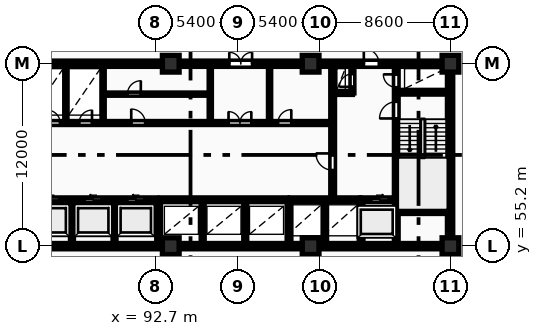
"""IFC4 building model, lengths in metres.
Left out: names, types, materials, properties, quantities, classifications, styles, units other than length and angle.
Written with IfcOpenShell. Run it as: python <this file> out.ifc"""

import sys

from ifc_helpers import new_model, si_unit, direction, frame, frame_2d, origin, origin_2d, place, context, subcontext, project, spatial, rectangle, extrude, element, fill, save


model = new_model("IFC4")
c1 = context("Model", 3, precision=1e-05, world=origin(), true_north=direction((0.0, 1.0)))
c2 = subcontext(c1, "Body", "Model", "MODEL_VIEW")
j1 = project(units=[si_unit("LENGTHUNIT", "METRE"), si_unit("PLANEANGLEUNIT", "RADIAN")], contexts=[c1])
p1 = place(None, origin())
s1 = spatial("IfcSite", under=j1, at=p1, CompositionType="ELEMENT")
p2 = place(p1, origin())
s2 = spatial("IfcBuilding", under=s1, at=p2, CompositionType="ELEMENT")
p3 = place(p2, frame((0.0, 0.0, -3.6)))
s3 = spatial("IfcBuildingStorey", under=s2, at=p3, CompositionType="ELEMENT", Elevation=-3.6)
for number, where, z_axis, x_axis in (
    (1, (93.7, 55.2, 0.0), (0.0, 0.0, 1.0), (1.0, 0.0, 0.0)),
    (2, (93.7, 67.2, 0.0), (0.0, 0.0, 1.0), (1.0, 0.0, 0.0)),
    (3, (102.9, 55.2, 0.0), (0.0, 0.0, 1.0), (1.0, 0.0, 0.0)),
    (4, (102.9, 67.2, 0.0), (0.0, 0.0, 1.0), (1.0, 0.0, 0.0)),
    (5, (112.1, 55.2, 0.0), (0.0, 0.0, 1.0), (1.0, 0.0, 0.0)),
    (6, (112.1, 67.2, 0.0), (0.0, 0.0, 1.0), (1.0, 0.0, 0.0)),
):
    element("IfcColumn", number, at=place(p3, frame(where, z_axis=z_axis, x_axis=x_axis)), inside=s3, PredefinedType="COLUMN", context=c2, shape_type="SweptSolid", body=[
        extrude(rectangle(XDim=1.1, YDim=1.1, at=origin_2d()), origin(), (0.0, 0.0, 1.0), 3.6),
    ])
p4 = place(p3, frame((75.95, 55.2, 0.0), z_axis=(0.0, 0.0, 1.0), x_axis=(1.0, 0.0, 0.0)))
e7 = element("IfcWall", 7, at=p4, inside=s3, PredefinedType="SHEAR", context=c2, shape_type="SweptSolid", body=[
    extrude(rectangle(XDim=36.3, YDim=0.35, at=frame_2d((18.15, 0.0))), origin(), (0.0, 0.0, 1.0), 3.6),
])
p5 = place(p3, frame((112.075, 55.375, 0.0), z_axis=(0.0, 0.0, 1.0), x_axis=(0.0, 1.0, 0.0)))
e8 = element("IfcWall", 8, at=p5, inside=s3, PredefinedType="SHEAR", context=c2, shape_type="SweptSolid", body=[
    extrude(rectangle(XDim=11.65, YDim=0.35, at=frame_2d((5.825, 0.0))), origin(), (0.0, 0.0, 1.0), 3.6),
])
p6 = place(p3, frame((75.95, 67.2, 0.0), z_axis=(0.0, 0.0, 1.0), x_axis=(1.0, 0.0, 0.0)))
e9 = element("IfcWall", 9, at=p6, inside=s3, PredefinedType="SHEAR", context=c2, shape_type="SweptSolid", body=[
    extrude(rectangle(XDim=36.3, YDim=0.35, at=frame_2d((18.15, 0.0))), origin(), (0.0, 0.0, 1.0), 3.6),
])
p7 = place(p6, frame((5.25, 0.0, 0.0)))
e10 = element("IfcOpeningElement", 10, at=p7, cuts=e9, PredefinedType="OPENING", context=c2, shape_type="SweptSolid", body=[
    extrude(rectangle(XDim=1.0, YDim=2.15, at=frame_2d((0.5, 1.075))), frame((0.0, 0.185, 0.0), z_axis=(0.0, -1.0, 0.0), x_axis=(1.0, 0.0, 0.0)), (0.0, 0.0, 1.0), 0.37),
])
p8 = place(p6, frame((21.6, 0.0, 0.0)))
e11 = element("IfcOpeningElement", 11, at=p8, cuts=e9, PredefinedType="OPENING", context=c2, shape_type="SweptSolid", body=[
    extrude(rectangle(XDim=1.5, YDim=2.2, at=frame_2d((0.75, 1.1))), frame((0.0, 0.185, 0.0), z_axis=(0.0, -1.0, 0.0), x_axis=(1.0, 0.0, 0.0)), (0.0, 0.0, 1.0), 0.37),
])
p9 = place(p6, frame((30.45, 0.0, 0.0)))
e12 = element("IfcOpeningElement", 12, at=p9, cuts=e9, PredefinedType="OPENING", context=c2, shape_type="SweptSolid", body=[
    extrude(rectangle(XDim=1.0, YDim=2.15, at=frame_2d((0.5, 1.075))), frame((0.0, 0.185, 0.0), z_axis=(0.0, -1.0, 0.0), x_axis=(1.0, 0.0, 0.0)), (0.0, 0.0, 1.0), 0.37),
])
for number, where, z_axis, x_axis in (
    (13, (87.2, 55.4, 0.0), (0.0, 0.0, 1.0), (0.0, 1.0, 0.0)),
    (14, (90.0, 55.4, 0.0), (0.0, 0.0, 1.0), (0.0, 1.0, 0.0)),
):
    element("IfcWall", number, at=place(p3, frame(where, z_axis=z_axis, x_axis=x_axis)), inside=s3, PredefinedType="PARTITIONING", context=c2, shape_type="SweptSolid", body=[
        extrude(rectangle(XDim=2.72, YDim=0.2, at=frame_2d((1.36, 0.0))), origin(), (0.0, 0.0, 1.0), 3.3),
    ])
p10 = place(p3, frame((84.42, 58.25, 0.0), z_axis=(0.0, 0.0, 1.0), x_axis=(1.0, 0.0, 0.0)))
e15 = element("IfcWall", 15, at=p10, inside=s3, PredefinedType="SHEAR", context=c2, shape_type="SweptSolid", body=[
    extrude(rectangle(XDim=8.36, YDim=0.25, at=frame_2d((4.18, 0.0))), origin(), (0.0, 0.0, 1.0), 3.6),
])
p11 = place(p10, frame((0.82, 0.0, 0.0)))
e16 = element("IfcOpeningElement", 16, at=p11, cuts=e15, PredefinedType="OPENING", context=c2, shape_type="SweptSolid", body=[
    extrude(rectangle(XDim=1.12, YDim=2.12, at=frame_2d((0.56, 1.06))), frame((0.0, 0.135, 0.0), z_axis=(0.0, -1.0, 0.0), x_axis=(1.0, 0.0, 0.0)), (0.0, 0.0, 1.0), 0.27),
])
p12 = place(p10, frame((3.62, 0.0, 0.0)))
e17 = element("IfcOpeningElement", 17, at=p12, cuts=e15, PredefinedType="OPENING", context=c2, shape_type="SweptSolid", body=[
    extrude(rectangle(XDim=1.12, YDim=2.12, at=frame_2d((0.56, 1.06))), frame((0.0, 0.135, 0.0), z_axis=(0.0, -1.0, 0.0), x_axis=(1.0, 0.0, 0.0)), (0.0, 0.0, 1.0), 0.27),
])
p13 = place(p10, frame((6.42, 0.0, 0.0)))
e18 = element("IfcOpeningElement", 18, at=p13, cuts=e15, PredefinedType="OPENING", context=c2, shape_type="SweptSolid", body=[
    extrude(rectangle(XDim=1.12, YDim=2.12, at=frame_2d((0.56, 1.06))), frame((0.0, 0.135, 0.0), z_axis=(0.0, -1.0, 0.0), x_axis=(1.0, 0.0, 0.0)), (0.0, 0.0, 1.0), 0.27),
])
p14 = place(p3, frame((92.9, 55.4, 0.0), z_axis=(0.0, 0.0, 1.0), x_axis=(0.0, 1.0, 0.0)))
e19 = element("IfcWall", 19, at=p14, inside=s3, PredefinedType="SHEAR", context=c2, shape_type="SweptSolid", body=[
    extrude(rectangle(XDim=2.85, YDim=0.25, at=frame_2d((1.425, 0.0))), origin(), (0.0, 0.0, 1.0), 3.6),
])
for number, where, z_axis, x_axis in (
    (20, (95.8, 55.4, 0.0), (0.0, 0.0, 1.0), (0.0, 1.0, 0.0)),
    (21, (98.6, 55.4, 0.0), (0.0, 0.0, 1.0), (0.0, 1.0, 0.0)),
):
    element("IfcWall", number, at=place(p3, frame(where, z_axis=z_axis, x_axis=x_axis)), inside=s3, PredefinedType="PARTITIONING", context=c2, shape_type="SweptSolid", body=[
        extrude(rectangle(XDim=2.72, YDim=0.2, at=frame_2d((1.36, 0.0))), origin(), (0.0, 0.0, 1.0), 3.3),
    ])
p15 = place(p3, frame((93.02, 58.25, 0.0), z_axis=(0.0, 0.0, 1.0), x_axis=(1.0, 0.0, 0.0)))
e22 = element("IfcWall", 22, at=p15, inside=s3, PredefinedType="SHEAR", context=c2, shape_type="SweptSolid", body=[
    extrude(rectangle(XDim=8.36, YDim=0.25, at=frame_2d((4.18, 0.0))), origin(), (0.0, 0.0, 1.0), 3.6),
])
p16 = place(p3, frame((101.48, 55.4, 0.0), z_axis=(0.0, 0.0, 1.0), x_axis=(0.0, 1.0, 0.0)))
e23 = element("IfcWall", 23, at=p16, inside=s3, PredefinedType="SHEAR", context=c2, shape_type="SweptSolid", body=[
    extrude(rectangle(XDim=2.85, YDim=0.25, at=frame_2d((1.425, 0.0))), origin(), (0.0, 0.0, 1.0), 3.6),
])
p17 = place(p3, frame((103.85, 55.4, 0.0), z_axis=(0.0, 0.0, 1.0), x_axis=(0.0, 1.0, 0.0)))
e24 = element("IfcWall", 24, at=p17, inside=s3, PredefinedType="PARTITIONING", context=c2, shape_type="SweptSolid", body=[
    extrude(rectangle(XDim=2.72, YDim=0.2, at=frame_2d((1.36, 0.0))), origin(), (0.0, 0.0, 1.0), 3.3),
])
p18 = place(p3, frame((101.55, 58.25, 0.0), z_axis=(0.0, 0.0, 1.0), x_axis=(1.0, 0.0, 0.0)))
e25 = element("IfcWall", 25, at=p18, inside=s3, PredefinedType="SHEAR", context=c2, shape_type="SweptSolid", body=[
    extrude(rectangle(XDim=4.6, YDim=0.25, at=frame_2d((2.3, 0.0))), origin(), (0.0, 0.0, 1.0), 3.6),
])
p19 = place(p3, frame((106.22, 55.4, 0.0), z_axis=(0.0, 0.0, 1.0), x_axis=(0.0, 1.0, 0.0)))
e26 = element("IfcWall", 26, at=p19, inside=s3, PredefinedType="SHEAR", context=c2, shape_type="SweptSolid", body=[
    extrude(rectangle(XDim=2.85, YDim=0.25, at=frame_2d((1.425, 0.0))), origin(), (0.0, 0.0, 1.0), 3.6),
])
p20 = place(p3, frame((106.22, 58.25, 0.0), z_axis=(0.0, 0.0, 1.0), x_axis=(1.0, 0.0, 0.0)))
e27 = element("IfcWall", 27, at=p20, inside=s3, PredefinedType="SHEAR", context=c2, shape_type="SweptSolid", body=[
    extrude(rectangle(XDim=2.46, YDim=0.25, at=frame_2d((1.23, 0.0))), origin(), (0.0, 0.0, 1.0), 3.6),
])
p21 = place(p20, frame((0.67, 0.0, 0.0)))
e28 = element("IfcOpeningElement", 28, at=p21, cuts=e27, PredefinedType="OPENING", context=c2, shape_type="SweptSolid", body=[
    extrude(rectangle(XDim=1.12, YDim=2.12, at=frame_2d((0.56, 1.06))), frame((0.0, 0.135, 0.0), z_axis=(0.0, -1.0, 0.0), x_axis=(1.0, 0.0, 0.0)), (0.0, 0.0, 1.0), 0.27),
])
for number, where, z_axis, x_axis in (
    (29, (86.8, 63.4, 0.0), (0.0, 0.0, 1.0), (0.0, 1.0, 0.0)),
    (30, (89.25, 63.4, 0.0), (0.0, 0.0, 1.0), (0.0, 1.0, 0.0)),
):
    element("IfcWall", number, at=place(p3, frame(where, z_axis=z_axis, x_axis=x_axis)), inside=s3, PredefinedType="PARTITIONING", context=c2, shape_type="SweptSolid", body=[
        extrude(rectangle(XDim=3.6, YDim=0.15, at=frame_2d((1.8, 0.0))), origin(), (0.0, 0.0, 1.0), 3.3),
    ])
p22 = place(p3, frame((89.25, 65.2, 0.0), z_axis=(0.0, 0.0, 1.0), x_axis=(1.0, 0.0, 0.0)))
e31 = element("IfcWall", 31, at=p22, inside=s3, PredefinedType="PARTITIONING", context=c2, shape_type="SweptSolid", body=[
    extrude(rectangle(XDim=7.05, YDim=0.15, at=frame_2d((3.525, 0.0))), origin(), (0.0, 0.0, 1.0), 3.3),
])
p23 = place(p22, frame((1.6, 0.0, 0.0)))
e32 = element("IfcOpeningElement", 32, at=p23, cuts=e31, PredefinedType="OPENING", context=c2, shape_type="SweptSolid", body=[
    extrude(rectangle(XDim=0.88, YDim=2.06, at=frame_2d((0.44, 1.03))), frame((0.0, 0.085, 0.0), z_axis=(0.0, -1.0, 0.0), x_axis=(1.0, 0.0, 0.0)), (0.0, 0.0, 1.0), 0.17),
])
for number, where, z_axis, x_axis in (
    (33, (96.3, 63.4, 0.0), (0.0, 0.0, 1.0), (0.0, 1.0, 0.0)),
    (34, (100.2, 63.4, 0.0), (0.0, 0.0, 1.0), (0.0, 1.0, 0.0)),
):
    element("IfcWall", number, at=place(p3, frame(where, z_axis=z_axis, x_axis=x_axis)), inside=s3, PredefinedType="PARTITIONING", context=c2, shape_type="SweptSolid", body=[
        extrude(rectangle(XDim=3.6, YDim=0.15, at=frame_2d((1.8, 0.0))), origin(), (0.0, 0.0, 1.0), 3.3),
    ])
p24 = place(p3, frame((84.42, 63.3, 0.0), z_axis=(0.0, 0.0, 1.0), x_axis=(1.0, 0.0, 0.0)))
e35 = element("IfcWall", 35, at=p24, inside=s3, PredefinedType="PARTITIONING", context=c2, shape_type="SweptSolid", body=[
    extrude(rectangle(XDim=19.83, YDim=0.2, at=frame_2d((9.915, 0.0))), origin(), (0.0, 0.0, 1.0), 3.3),
])
p25 = place(p24, frame((1.15, 0.0, 0.0)))
e36 = element("IfcOpeningElement", 36, at=p25, cuts=e35, PredefinedType="OPENING", context=c2, shape_type="SweptSolid", body=[
    extrude(rectangle(XDim=0.85, YDim=2.05, at=frame_2d((0.425, 1.025))), frame((0.0, 0.11, 0.0), z_axis=(0.0, -1.0, 0.0), x_axis=(1.0, 0.0, 0.0)), (0.0, 0.0, 1.0), 0.22),
])
p26 = place(p24, frame((3.25, 0.0, 0.0)))
e37 = element("IfcOpeningElement", 37, at=p26, cuts=e35, PredefinedType="OPENING", context=c2, shape_type="SweptSolid", body=[
    extrude(rectangle(XDim=0.85, YDim=2.05, at=frame_2d((0.425, 1.025))), frame((0.0, 0.11, 0.0), z_axis=(0.0, -1.0, 0.0), x_axis=(1.0, 0.0, 0.0)), (0.0, 0.0, 1.0), 0.22),
])
p27 = place(p24, frame((13.08, 0.0, 0.0)))
e38 = element("IfcOpeningElement", 38, at=p27, cuts=e35, PredefinedType="OPENING", context=c2, shape_type="SweptSolid", body=[
    extrude(rectangle(XDim=1.5, YDim=2.2, at=frame_2d((0.75, 1.1))), frame((0.0, 0.11, 0.0), z_axis=(0.0, -1.0, 0.0), x_axis=(1.0, 0.0, 0.0)), (0.0, 0.0, 1.0), 0.22),
])
p28 = place(p24, frame((6.68, 0.0, 0.0)))
e39 = element("IfcOpeningElement", 39, at=p28, cuts=e35, PredefinedType="OPENING", context=c2, shape_type="SweptSolid", body=[
    extrude(rectangle(XDim=0.92, YDim=2.08, at=frame_2d((0.46, 1.04))), frame((0.0, 0.11, 0.0), z_axis=(0.0, -1.0, 0.0), x_axis=(1.0, 0.0, 0.0)), (0.0, 0.0, 1.0), 0.22),
])
p29 = place(p24, frame((16.33, 0.0, 0.0)))
e40 = element("IfcOpeningElement", 40, at=p29, cuts=e35, PredefinedType="OPENING", context=c2, shape_type="SweptSolid", body=[
    extrude(rectangle(XDim=0.88, YDim=2.06, at=frame_2d((0.44, 1.03))), frame((0.0, 0.11, 0.0), z_axis=(0.0, -1.0, 0.0), x_axis=(1.0, 0.0, 0.0)), (0.0, 0.0, 1.0), 0.22),
])
p30 = place(p3, frame((104.45, 65.28, 0.0), z_axis=(0.0, 0.0, 1.0), x_axis=(1.0, 0.0, 0.0)))
e41 = element("IfcWall", 41, at=p30, inside=s3, PredefinedType="PARTITIONING", context=c2, shape_type="SweptSolid", body=[
    extrude(rectangle(XDim=1.2, YDim=0.2, at=frame_2d((0.6, 0.0))), origin(), (0.0, 0.0, 1.0), 3.3),
])
p31 = place(p3, frame((105.65, 65.28, 0.0), z_axis=(0.0, 0.0, 1.0), x_axis=(0.0, 1.0, 0.0)))
e42 = element("IfcWall", 42, at=p31, inside=s3, PredefinedType="PARTITIONING", context=c2, shape_type="SweptSolid", body=[
    extrude(rectangle(XDim=1.72, YDim=0.2, at=frame_2d((0.86, 0.0))), origin(), (0.0, 0.0, 1.0), 3.3),
])
p32 = place(p31, frame((0.4, 0.0, 0.0)))
e43 = element("IfcOpeningElement", 43, at=p32, cuts=e42, PredefinedType="OPENING", context=c2, shape_type="SweptSolid", body=[
    extrude(rectangle(XDim=0.85, YDim=2.05, at=frame_2d((0.425, 1.025))), frame((0.0, 0.11, 0.0), z_axis=(0.0, -1.0, 0.0), x_axis=(1.0, 0.0, 0.0)), (0.0, 0.0, 1.0), 0.22),
])
p33 = place(p3, frame((104.35, 58.4, 0.0), z_axis=(0.0, 0.0, 1.0), x_axis=(0.0, 1.0, 0.0)))
e44 = element("IfcWall", 44, at=p33, inside=s3, PredefinedType="SHEAR", context=c2, shape_type="SweptSolid", body=[
    extrude(rectangle(XDim=8.6, YDim=0.25, at=frame_2d((4.3, 0.0))), origin(), (0.0, 0.0, 1.0), 3.6),
])
p34 = place(p33, frame((1.8, 0.0, 0.0)))
e45 = element("IfcOpeningElement", 45, at=p34, cuts=e44, PredefinedType="OPENING", context=c2, shape_type="SweptSolid", body=[
    extrude(rectangle(XDim=1.1, YDim=2.1, at=frame_2d((0.55, 1.05))), frame((0.0, 0.135, 0.0), z_axis=(0.0, -1.0, 0.0), x_axis=(1.0, 0.0, 0.0)), (0.0, 0.0, 1.0), 0.27),
])
p35 = place(p3, frame((108.535, 55.4, 0.0), z_axis=(0.0, 0.0, 1.0), x_axis=(0.0, 1.0, 0.0)))
e46 = element("IfcWall", 46, at=p35, inside=s3, PredefinedType="SHEAR", context=c2, shape_type="SweptSolid", body=[
    extrude(rectangle(XDim=11.6, YDim=0.25, at=frame_2d((5.8, 0.0))), origin(), (0.0, 0.0, 1.0), 3.6),
])
p36 = place(p35, frame((8.2, 0.0, 0.0)))
e47 = element("IfcOpeningElement", 47, at=p36, cuts=e46, PredefinedType="OPENING", context=c2, shape_type="SweptSolid", body=[
    extrude(rectangle(XDim=1.1, YDim=2.1, at=frame_2d((0.55, 1.05))), frame((0.0, 0.135, 0.0), z_axis=(0.0, -1.0, 0.0), x_axis=(1.0, 0.0, 0.0)), (0.0, 0.0, 1.0), 0.27),
])
p37 = place(p35, frame((10.25, 0.0, 0.0)))
e48 = element("IfcOpeningElement", 48, at=p37, cuts=e46, PredefinedType="OPENING", context=c2, shape_type="SweptSolid", body=[
    extrude(rectangle(XDim=0.85, YDim=2.05, at=frame_2d((0.425, 1.025))), frame((0.0, 0.135, 0.0), z_axis=(0.0, -1.0, 0.0), x_axis=(1.0, 0.0, 0.0)), (0.0, 0.0, 1.0), 0.27),
])
for number, where, z_axis, x_axis in (
    (49, (108.66, 57.475, 0.0), (0.0, 0.0, 1.0), (1.0, 0.0, 0.0)),
    (50, (108.66, 65.325, 0.0), (0.0, 0.0, 1.0), (1.0, 0.0, 0.0)),
):
    element("IfcWall", number, at=place(p3, frame(where, z_axis=z_axis, x_axis=x_axis)), inside=s3, PredefinedType="SHEAR", context=c2, shape_type="SweptSolid", body=[
        extrude(rectangle(XDim=3.24, YDim=0.25, at=frame_2d((1.62, 0.0))), origin(), (0.0, 0.0, 1.0), 3.6),
    ])
p38 = place(p8, origin())
e51 = element("IfcDoor", 51, at=p38, inside=s3, OperationType="DOUBLE_DOOR_SINGLE_SWING", PredefinedType="DOOR", context=c2, shape_type="SweptSolid", body=[
    extrude(rectangle(XDim=1.5, YDim=2.2, at=frame_2d((0.75, 1.1))), frame((0.0, 0.025, 0.0), z_axis=(0.0, -1.0, 0.0), x_axis=(1.0, 0.0, 0.0)), (0.0, 0.0, 1.0), 0.05),
])
fill(e11, e51)
p39 = place(p9, origin())
e52 = element("IfcDoor", 52, at=p39, inside=s3, OperationType="SINGLE_SWING_LEFT", PredefinedType="DOOR", context=c2, shape_type="SweptSolid", body=[
    extrude(rectangle(XDim=1.0, YDim=2.15, at=frame_2d((0.5, 1.075))), frame((0.0, 0.025, 0.0), z_axis=(0.0, -1.0, 0.0), x_axis=(1.0, 0.0, 0.0)), (0.0, 0.0, 1.0), 0.05),
])
fill(e12, e52)
p40 = place(p11, origin())
e53 = element("IfcDoor", 53, at=p40, inside=s3, OperationType="SLIDING_TO_LEFT", PredefinedType="DOOR", context=c2, shape_type="SweptSolid", body=[
    extrude(rectangle(XDim=1.12, YDim=2.12, at=frame_2d((0.56, 1.06))), frame((0.0, 0.025, 0.0), z_axis=(0.0, -1.0, 0.0), x_axis=(1.0, 0.0, 0.0)), (0.0, 0.0, 1.0), 0.05),
])
fill(e16, e53)
p41 = place(p12, origin())
e54 = element("IfcDoor", 54, at=p41, inside=s3, OperationType="SLIDING_TO_LEFT", PredefinedType="DOOR", context=c2, shape_type="SweptSolid", body=[
    extrude(rectangle(XDim=1.12, YDim=2.12, at=frame_2d((0.56, 1.06))), frame((0.0, 0.025, 0.0), z_axis=(0.0, -1.0, 0.0), x_axis=(1.0, 0.0, 0.0)), (0.0, 0.0, 1.0), 0.05),
])
fill(e17, e54)
p42 = place(p13, origin())
e55 = element("IfcDoor", 55, at=p42, inside=s3, OperationType="SLIDING_TO_LEFT", PredefinedType="DOOR", context=c2, shape_type="SweptSolid", body=[
    extrude(rectangle(XDim=1.12, YDim=2.12, at=frame_2d((0.56, 1.06))), frame((0.0, 0.025, 0.0), z_axis=(0.0, -1.0, 0.0), x_axis=(1.0, 0.0, 0.0)), (0.0, 0.0, 1.0), 0.05),
])
fill(e18, e55)
p43 = place(p21, origin())
e56 = element("IfcDoor", 56, at=p43, inside=s3, OperationType="SLIDING_TO_RIGHT", PredefinedType="DOOR", context=c2, shape_type="SweptSolid", body=[
    extrude(rectangle(XDim=1.12, YDim=2.12, at=frame_2d((0.56, 1.06))), frame((0.0, 0.025, 0.0), z_axis=(0.0, -1.0, 0.0), x_axis=(1.0, 0.0, 0.0)), (0.0, 0.0, 1.0), 0.05),
])
fill(e28, e56)
p44 = place(p23, origin())
e57 = element("IfcDoor", 57, at=p44, inside=s3, OperationType="SINGLE_SWING_RIGHT", PredefinedType="DOOR", context=c2, shape_type="SweptSolid", body=[
    extrude(rectangle(XDim=0.88, YDim=2.06, at=frame_2d((0.44, 1.03))), frame((0.0, 0.025, 0.0), z_axis=(0.0, -1.0, 0.0), x_axis=(1.0, 0.0, 0.0)), (0.0, 0.0, 1.0), 0.05),
])
fill(e32, e57)
p45 = place(p25, origin())
e58 = element("IfcDoor", 58, at=p45, inside=s3, OperationType="SINGLE_SWING_LEFT", PredefinedType="DOOR", context=c2, shape_type="SweptSolid", body=[
    extrude(rectangle(XDim=0.85, YDim=2.05, at=frame_2d((0.425, 1.025))), frame((0.0, 0.025, 0.0), z_axis=(0.0, -1.0, 0.0), x_axis=(1.0, 0.0, 0.0)), (0.0, 0.0, 1.0), 0.05),
])
fill(e36, e58)
p46 = place(p26, origin())
e59 = element("IfcDoor", 59, at=p46, inside=s3, OperationType="SINGLE_SWING_RIGHT", PredefinedType="DOOR", context=c2, shape_type="SweptSolid", body=[
    extrude(rectangle(XDim=0.85, YDim=2.05, at=frame_2d((0.425, 1.025))), frame((0.0, 0.025, 0.0), z_axis=(0.0, -1.0, 0.0), x_axis=(1.0, 0.0, 0.0)), (0.0, 0.0, 1.0), 0.05),
])
fill(e37, e59)
p47 = place(p27, origin())
e60 = element("IfcDoor", 60, at=p47, inside=s3, OperationType="DOUBLE_DOOR_SINGLE_SWING", PredefinedType="DOOR", context=c2, shape_type="SweptSolid", body=[
    extrude(rectangle(XDim=1.5, YDim=2.2, at=frame_2d((0.75, 1.1))), frame((0.0, 0.025, 0.0), z_axis=(0.0, -1.0, 0.0), x_axis=(1.0, 0.0, 0.0)), (0.0, 0.0, 1.0), 0.05),
])
fill(e38, e60)
p48 = place(p28, origin())
e61 = element("IfcDoor", 61, at=p48, inside=s3, OperationType="SINGLE_SWING_LEFT", PredefinedType="DOOR", context=c2, shape_type="SweptSolid", body=[
    extrude(rectangle(XDim=0.92, YDim=2.08, at=frame_2d((0.46, 1.04))), frame((0.0, 0.025, 0.0), z_axis=(0.0, -1.0, 0.0), x_axis=(1.0, 0.0, 0.0)), (0.0, 0.0, 1.0), 0.05),
])
fill(e39, e61)
p49 = place(p29, origin())
e62 = element("IfcDoor", 62, at=p49, inside=s3, OperationType="SINGLE_SWING_RIGHT", PredefinedType="DOOR", context=c2, shape_type="SweptSolid", body=[
    extrude(rectangle(XDim=0.88, YDim=2.06, at=frame_2d((0.44, 1.03))), frame((0.0, 0.025, 0.0), z_axis=(0.0, -1.0, 0.0), x_axis=(1.0, 0.0, 0.0)), (0.0, 0.0, 1.0), 0.05),
])
fill(e40, e62)
p50 = place(p32, origin())
e63 = element("IfcDoor", 63, at=p50, inside=s3, OperationType="SINGLE_SWING_LEFT", PredefinedType="DOOR", context=c2, shape_type="SweptSolid", body=[
    extrude(rectangle(XDim=0.85, YDim=2.05, at=frame_2d((0.425, 1.025))), frame((0.0, 0.025, 0.0), z_axis=(0.0, -1.0, 0.0), x_axis=(1.0, 0.0, 0.0)), (0.0, 0.0, 1.0), 0.05),
])
fill(e43, e63)
p51 = place(p34, origin())
e64 = element("IfcDoor", 64, at=p51, inside=s3, OperationType="SINGLE_SWING_RIGHT", PredefinedType="DOOR", context=c2, shape_type="SweptSolid", body=[
    extrude(rectangle(XDim=1.1, YDim=2.1, at=frame_2d((0.55, 1.05))), frame((0.0, 0.025, 0.0), z_axis=(0.0, -1.0, 0.0), x_axis=(1.0, 0.0, 0.0)), (0.0, 0.0, 1.0), 0.05),
])
fill(e45, e64)
p52 = place(p36, origin())
e65 = element("IfcDoor", 65, at=p52, inside=s3, OperationType="SINGLE_SWING_LEFT", PredefinedType="DOOR", context=c2, shape_type="SweptSolid", body=[
    extrude(rectangle(XDim=1.1, YDim=2.1, at=frame_2d((0.55, 1.05))), frame((0.0, 0.025, 0.0), z_axis=(0.0, -1.0, 0.0), x_axis=(1.0, 0.0, 0.0)), (0.0, 0.0, 1.0), 0.05),
])
fill(e47, e65)
p53 = place(p37, origin())
e66 = element("IfcDoor", 66, at=p53, inside=s3, OperationType="SINGLE_SWING_RIGHT", PredefinedType="DOOR", context=c2, shape_type="SweptSolid", body=[
    extrude(rectangle(XDim=0.85, YDim=2.05, at=frame_2d((0.425, 1.025))), frame((0.0, 0.025, 0.0), z_axis=(0.0, -1.0, 0.0), x_axis=(1.0, 0.0, 0.0)), (0.0, 0.0, 1.0), 0.05),
])
fill(e48, e66)
save(model, sys.argv[1])
